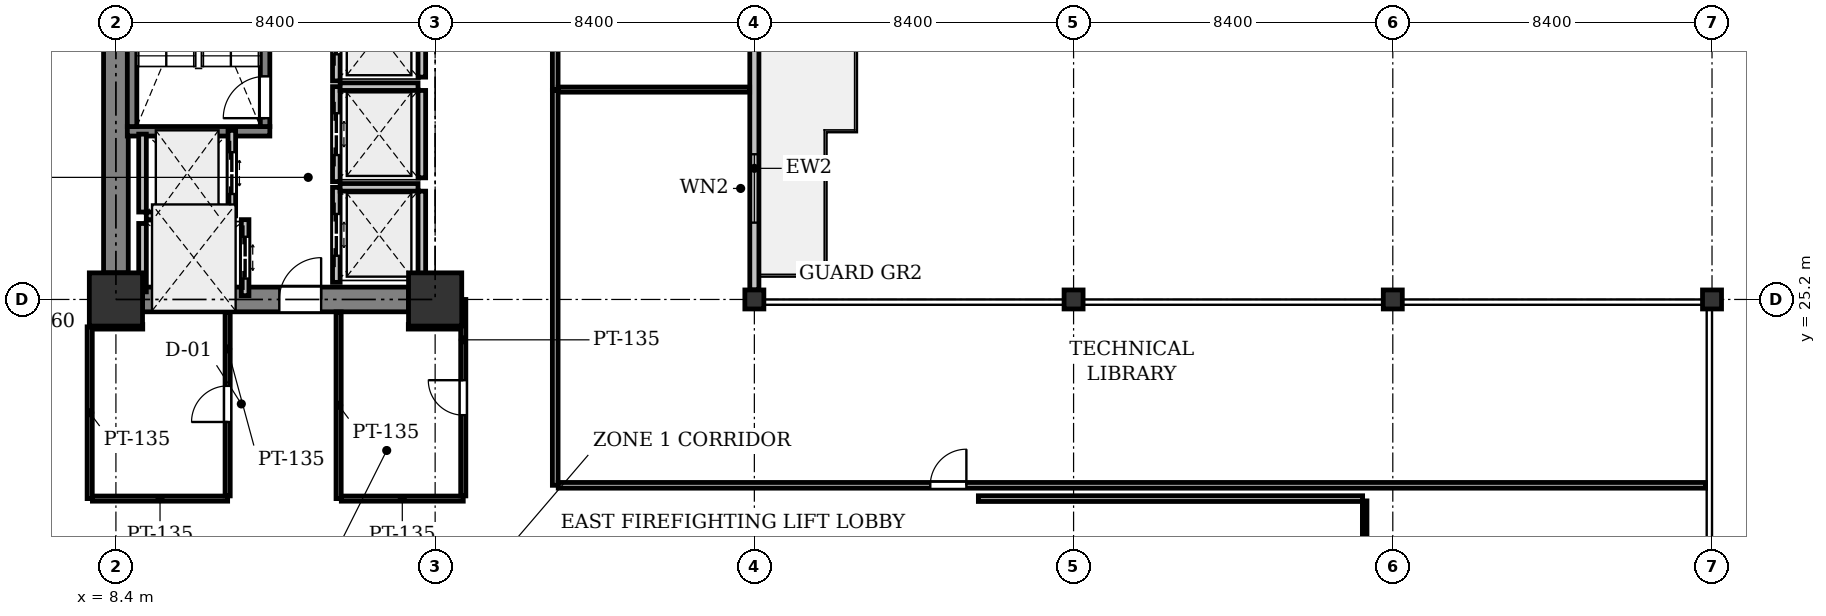
"""IFC4 building model, lengths in metres.
Left out: names, types, materials, properties, quantities, classifications, styles, units other than length and angle.
Written with IfcOpenShell. Run it as: python <this file> out.ifc"""

import sys

from ifc_helpers import new_model, si_unit, direction, frame, frame_2d, origin, origin_2d, place, context, subcontext, project, spatial, rectangle, i_section, extrude, element, fill, save


model = new_model("IFC4")
c1 = context("Model", 3, precision=1e-05, world=origin(), true_north=direction((0.0, 1.0)))
c2 = subcontext(c1, "Body", "Model", "MODEL_VIEW")
j1 = project(units=[si_unit("LENGTHUNIT", "METRE"), si_unit("PLANEANGLEUNIT", "RADIAN")], contexts=[c1])
p1 = place(None, origin())
s1 = spatial("IfcSite", under=j1, at=p1, CompositionType="ELEMENT")
p2 = place(p1, origin())
s2 = spatial("IfcBuilding", under=s1, at=p2, CompositionType="ELEMENT")
p3 = place(p2, frame((0.0, 0.0, 50.0)))
s3 = spatial("IfcBuildingStorey", under=s2, at=p3, CompositionType="ELEMENT", Elevation=50.0)
for number, where, z_axis, x_axis in (
    (1, (8.4, 25.2, 0.0), (0.0, 0.0, 1.0), (1.0, 0.0, 0.0)),
    (2, (16.8, 25.2, 0.0), (0.0, 0.0, 1.0), (1.0, 0.0, 0.0)),
):
    element("IfcColumn", number, at=place(p3, frame(where, z_axis=z_axis, x_axis=x_axis)), inside=s3, PredefinedType="COLUMN", context=c2, shape_type="SweptSolid", body=[
        extrude(rectangle(XDim=1.4, YDim=1.4, at=origin_2d()), origin(), (0.0, 0.0, 1.0), 4.2),
    ])
for number, where, z_axis, x_axis in (
    (3, (25.2, 25.2, 0.0), (0.0, 0.0, 1.0), (1.0, 0.0, 0.0)),
    (4, (33.6, 25.2, 0.0), (0.0, 0.0, 1.0), (1.0, 0.0, 0.0)),
    (5, (42.0, 25.2, 0.0), (0.0, 0.0, 1.0), (1.0, 0.0, 0.0)),
    (6, (50.4, 25.2, 0.0), (0.0, 0.0, 1.0), (1.0, 0.0, 0.0)),
):
    element("IfcColumn", number, at=place(p3, frame(where, z_axis=z_axis, x_axis=x_axis)), inside=s3, PredefinedType="COLUMN", context=c2, shape_type="SweptSolid", body=[
        extrude(i_section(OverallWidth=0.5, OverallDepth=0.5, WebThickness=0.028, FlangeThickness=0.04, at=origin_2d()), origin(), (0.0, 0.0, 1.0), 4.2),
    ])
p4 = place(p3, frame((25.2, 33.35, 0.0), z_axis=(0.0, 0.0, 1.0), x_axis=(0.0, -1.0, 0.0)))
e7 = element("IfcWall", 7, at=p4, inside=s3, PredefinedType="STANDARD", context=c2, shape_type="SweptSolid", body=[
    extrude(rectangle(XDim=7.9, YDim=0.24, at=frame_2d((3.95, 0.0))), origin(), (0.0, 0.0, 1.0), 3.471),
])
p5 = place(p4, frame((0.3, 0.0, 0.0)))
e8 = element("IfcOpeningElement", 8, at=p5, cuts=e7, PredefinedType="OPENING", context=c2, shape_type="SweptSolid", body=[
    extrude(rectangle(XDim=1.2, YDim=2.2, at=frame_2d((0.6, 1.1))), frame((0.0, 0.13, 0.0), z_axis=(0.0, -1.0, 0.0), x_axis=(1.0, 0.0, 0.0)), (0.0, 0.0, 1.0), 0.26),
])
p6 = place(p4, frame((4.329, 0.0, 0.9)))
e9 = element("IfcOpeningElement", 9, at=p6, cuts=e7, PredefinedType="OPENING", context=c2, shape_type="SweptSolid", body=[
    extrude(rectangle(XDim=1.8, YDim=1.6, at=frame_2d((0.9, 0.8))), frame((0.0, 0.13, 0.0), z_axis=(0.0, -1.0, 0.0), x_axis=(1.0, 0.0, 0.0)), (0.0, 0.0, 1.0), 0.26),
])
p7 = place(p3, frame((8.4, 25.9, 0.0), z_axis=(0.0, 0.0, 1.0), x_axis=(0.0, 1.0, 0.0)))
e10 = element("IfcWall", 10, at=p7, inside=s3, PredefinedType="SHEAR", context=c2, shape_type="SweptSolid", body=[
    extrude(rectangle(XDim=7.0, YDim=0.65, at=frame_2d((3.5, 0.0))), origin(), (0.0, 0.0, 1.0), 3.925),
])
p8 = place(p3, frame((9.1, 25.2, 0.0), z_axis=(0.0, 0.0, 1.0), x_axis=(1.0, 0.0, 0.0)))
e11 = element("IfcWall", 11, at=p8, inside=s3, PredefinedType="SHEAR", context=c2, shape_type="SweptSolid", body=[
    extrude(rectangle(XDim=7.0, YDim=0.65, at=frame_2d((3.5, 0.0))), origin(), (0.0, 0.0, 1.0), 3.925),
])
p9 = place(p8, frame((3.6, 0.0, 0.0)))
e12 = element("IfcOpeningElement", 12, at=p9, cuts=e11, PredefinedType="OPENING", context=c2, shape_type="SweptSolid", body=[
    extrude(rectangle(XDim=1.1, YDim=2.15, at=frame_2d((0.55, 1.075))), frame((0.0, 0.335, 0.0), z_axis=(0.0, -1.0, 0.0), x_axis=(1.0, 0.0, 0.0)), (0.0, 0.0, 1.0), 0.67),
])
p10 = place(p3, frame((12.45, 29.625, 0.0), z_axis=(0.0, 0.0, 1.0), x_axis=(-1.0, 0.0, 0.0)))
e13 = element("IfcWall", 13, at=p10, inside=s3, PredefinedType="SHEAR", context=c2, shape_type="SweptSolid", body=[
    extrude(rectangle(XDim=3.75, YDim=0.25, at=frame_2d((1.875, 0.0))), origin(), (0.0, 0.0, 1.0), 3.925),
])
p11 = place(p3, frame((12.325, 29.75, 0.0), z_axis=(0.0, 0.0, 1.0), x_axis=(0.0, 1.0, 0.0)))
e14 = element("IfcWall", 14, at=p11, inside=s3, PredefinedType="SHEAR", context=c2, shape_type="SweptSolid", body=[
    extrude(rectangle(XDim=7.75, YDim=0.25, at=frame_2d((3.875, 0.0))), origin(), (0.0, 0.0, 1.0), 3.925),
])
p12 = place(p11, frame((0.22, 0.0, 0.0)))
e15 = element("IfcOpeningElement", 15, at=p12, cuts=e14, PredefinedType="OPENING", context=c2, shape_type="SweptSolid", body=[
    extrude(rectangle(XDim=1.1, YDim=2.15, at=frame_2d((0.55, 1.075))), frame((0.0, 0.135, 0.0), z_axis=(0.0, -1.0, 0.0), x_axis=(1.0, 0.0, 0.0)), (0.0, 0.0, 1.0), 0.27),
])
p13 = place(p3, frame((8.825, 29.75, 0.0), z_axis=(0.0, 0.0, 1.0), x_axis=(0.0, 1.0, 0.0)))
e16 = element("IfcWall", 16, at=p13, inside=s3, PredefinedType="SHEAR", context=c2, shape_type="SweptSolid", body=[
    extrude(rectangle(XDim=7.75, YDim=0.25, at=frame_2d((3.875, 0.0))), origin(), (0.0, 0.0, 1.0), 3.925),
])
p14 = place(p3, frame((11.45, 27.4, 0.0), z_axis=(0.0, 0.0, 1.0), x_axis=(0.0, 1.0, 0.0)))
e17 = element("IfcWall", 17, at=p14, inside=s3, PredefinedType="PARTITIONING", context=c2, shape_type="SweptSolid", body=[
    extrude(rectangle(XDim=2.25, YDim=0.2, at=frame_2d((1.125, 0.0))), origin(), (0.0, 0.0, 1.0), 3.925),
])
p15 = place(p14, frame((0.575, 0.0, 0.0)))
e18 = element("IfcOpeningElement", 18, at=p15, cuts=e17, PredefinedType="OPENING", context=c2, shape_type="SweptSolid", body=[
    extrude(rectangle(XDim=1.1, YDim=2.2, at=frame_2d((0.55, 1.1))), frame((0.0, 0.11, 0.0), z_axis=(0.0, -1.0, 0.0), x_axis=(1.0, 0.0, 0.0)), (0.0, 0.0, 1.0), 0.22),
])
p16 = place(p3, frame((9.1, 27.5, 0.0), z_axis=(0.0, 0.0, 1.0), x_axis=(0.0, 1.0, 0.0)))
e19 = element("IfcWall", 19, at=p16, inside=s3, PredefinedType="PARTITIONING", context=c2, shape_type="SweptSolid", body=[
    extrude(rectangle(XDim=2.05, YDim=0.2, at=frame_2d((1.025, 0.0))), origin(), (0.0, 0.0, 1.0), 3.925),
])
p17 = place(p3, frame((9.2, 27.4, 0.0), z_axis=(0.0, 0.0, 1.0), x_axis=(1.0, 0.0, 0.0)))
e20 = element("IfcWall", 20, at=p17, inside=s3, PredefinedType="PARTITIONING", context=c2, shape_type="SweptSolid", body=[
    extrude(rectangle(XDim=2.15, YDim=0.2, at=frame_2d((1.075, 0.0))), origin(), (0.0, 0.0, 1.0), 3.925),
])
p18 = place(p3, frame((11.8, 25.3, 0.0), z_axis=(0.0, 0.0, 1.0), x_axis=(0.0, 1.0, 0.0)))
e21 = element("IfcWall", 21, at=p18, inside=s3, PredefinedType="PARTITIONING", context=c2, shape_type="SweptSolid", body=[
    extrude(rectangle(XDim=2.0, YDim=0.2, at=frame_2d((1.0, 0.0))), origin(), (0.0, 0.0, 1.0), 3.925),
])
p19 = place(p18, frame((0.45, 0.0, 0.0)))
e22 = element("IfcOpeningElement", 22, at=p19, cuts=e21, PredefinedType="OPENING", context=c2, shape_type="SweptSolid", body=[
    extrude(rectangle(XDim=1.1, YDim=2.2, at=frame_2d((0.55, 1.1))), frame((0.0, 0.11, 0.0), z_axis=(0.0, -1.0, 0.0), x_axis=(1.0, 0.0, 0.0)), (0.0, 0.0, 1.0), 0.22),
])
p20 = place(p3, frame((9.1, 25.4, 0.0), z_axis=(0.0, 0.0, 1.0), x_axis=(0.0, 1.0, 0.0)))
e23 = element("IfcWall", 23, at=p20, inside=s3, PredefinedType="PARTITIONING", context=c2, shape_type="SweptSolid", body=[
    extrude(rectangle(XDim=1.8, YDim=0.2, at=frame_2d((0.9, 0.0))), origin(), (0.0, 0.0, 1.0), 3.925),
])
p21 = place(p3, frame((14.2, 25.65, 0.0), z_axis=(0.0, 0.0, 1.0), x_axis=(0.0, 1.0, 0.0)))
e24 = element("IfcWall", 24, at=p21, inside=s3, PredefinedType="PARTITIONING", context=c2, shape_type="SweptSolid", body=[
    extrude(rectangle(XDim=2.5, YDim=0.2, at=frame_2d((1.25, 0.0))), origin(), (0.0, 0.0, 1.0), 3.925),
])
p22 = place(p21, frame((0.7, 0.0, 0.0)))
e25 = element("IfcOpeningElement", 25, at=p22, cuts=e24, PredefinedType="OPENING", context=c2, shape_type="SweptSolid", body=[
    extrude(rectangle(XDim=1.1, YDim=2.2, at=frame_2d((0.55, 1.1))), frame((0.0, 0.11, 0.0), z_axis=(0.0, -1.0, 0.0), x_axis=(1.0, 0.0, 0.0)), (0.0, 0.0, 1.0), 0.22),
])
p23 = place(p3, frame((16.45, 25.75, 0.0), z_axis=(0.0, 0.0, 1.0), x_axis=(0.0, 1.0, 0.0)))
e26 = element("IfcWall", 26, at=p23, inside=s3, PredefinedType="PARTITIONING", context=c2, shape_type="SweptSolid", body=[
    extrude(rectangle(XDim=2.3, YDim=0.2, at=frame_2d((1.15, 0.0))), origin(), (0.0, 0.0, 1.0), 3.925),
])
p24 = place(p3, frame((14.3, 28.15, 0.0), z_axis=(0.0, 0.0, 1.0), x_axis=(1.0, 0.0, 0.0)))
e27 = element("IfcWall", 27, at=p24, inside=s3, PredefinedType="PARTITIONING", context=c2, shape_type="SweptSolid", body=[
    extrude(rectangle(XDim=2.05, YDim=0.2, at=frame_2d((1.025, 0.0))), origin(), (0.0, 0.0, 1.0), 3.925),
])
p25 = place(p3, frame((14.2, 28.3, 0.0), z_axis=(0.0, 0.0, 1.0), x_axis=(0.0, 1.0, 0.0)))
e28 = element("IfcWall", 28, at=p25, inside=s3, PredefinedType="PARTITIONING", context=c2, shape_type="SweptSolid", body=[
    extrude(rectangle(XDim=2.5, YDim=0.2, at=frame_2d((1.25, 0.0))), origin(), (0.0, 0.0, 1.0), 3.925),
])
p26 = place(p25, frame((0.7, 0.0, 0.0)))
e29 = element("IfcOpeningElement", 29, at=p26, cuts=e28, PredefinedType="OPENING", context=c2, shape_type="SweptSolid", body=[
    extrude(rectangle(XDim=1.1, YDim=2.2, at=frame_2d((0.55, 1.1))), frame((0.0, 0.11, 0.0), z_axis=(0.0, -1.0, 0.0), x_axis=(1.0, 0.0, 0.0)), (0.0, 0.0, 1.0), 0.22),
])
p27 = place(p3, frame((16.45, 28.4, 0.0), z_axis=(0.0, 0.0, 1.0), x_axis=(0.0, 1.0, 0.0)))
e30 = element("IfcWall", 30, at=p27, inside=s3, PredefinedType="PARTITIONING", context=c2, shape_type="SweptSolid", body=[
    extrude(rectangle(XDim=2.3, YDim=0.2, at=frame_2d((1.15, 0.0))), origin(), (0.0, 0.0, 1.0), 3.925),
])
p28 = place(p3, frame((14.3, 30.8, 0.0), z_axis=(0.0, 0.0, 1.0), x_axis=(1.0, 0.0, 0.0)))
e31 = element("IfcWall", 31, at=p28, inside=s3, PredefinedType="PARTITIONING", context=c2, shape_type="SweptSolid", body=[
    extrude(rectangle(XDim=2.05, YDim=0.2, at=frame_2d((1.025, 0.0))), origin(), (0.0, 0.0, 1.0), 3.925),
])
p29 = place(p3, frame((14.2, 30.95, 0.0), z_axis=(0.0, 0.0, 1.0), x_axis=(0.0, 1.0, 0.0)))
e32 = element("IfcWall", 32, at=p29, inside=s3, PredefinedType="PARTITIONING", context=c2, shape_type="SweptSolid", body=[
    extrude(rectangle(XDim=2.5, YDim=0.2, at=frame_2d((1.25, 0.0))), origin(), (0.0, 0.0, 1.0), 3.925),
])
p30 = place(p29, frame((0.7, 0.0, 0.0)))
e33 = element("IfcOpeningElement", 33, at=p30, cuts=e32, PredefinedType="OPENING", context=c2, shape_type="SweptSolid", body=[
    extrude(rectangle(XDim=1.1, YDim=2.2, at=frame_2d((0.55, 1.1))), frame((0.0, 0.11, 0.0), z_axis=(0.0, -1.0, 0.0), x_axis=(1.0, 0.0, 0.0)), (0.0, 0.0, 1.0), 0.22),
])
p31 = place(p3, frame((16.45, 31.05, 0.0), z_axis=(0.0, 0.0, 1.0), x_axis=(0.0, 1.0, 0.0)))
e34 = element("IfcWall", 34, at=p31, inside=s3, PredefinedType="PARTITIONING", context=c2, shape_type="SweptSolid", body=[
    extrude(rectangle(XDim=2.3, YDim=0.2, at=frame_2d((1.15, 0.0))), origin(), (0.0, 0.0, 1.0), 3.925),
])
p32 = place(p3, frame((14.26, 24.871, 0.0), z_axis=(0.0, 0.0, 1.0), x_axis=(0.0, -1.0, 0.0)))
e35 = element("IfcWall", 35, at=p32, inside=s3, PredefinedType="PARTITIONING", context=c2, shape_type="SweptSolid", body=[
    extrude(rectangle(XDim=4.911, YDim=0.135, at=frame_2d((2.456, 0.0))), origin(), (0.0, 0.0, 1.0), 3.925),
])
p33 = place(p3, frame((14.332, 19.96, 0.0), z_axis=(0.0, 0.0, 1.0), x_axis=(1.0, 0.0, 0.0)))
e36 = element("IfcWall", 36, at=p33, inside=s3, PredefinedType="PARTITIONING", context=c2, shape_type="SweptSolid", body=[
    extrude(rectangle(XDim=3.208, YDim=0.135, at=frame_2d((1.604, 0.0))), origin(), (0.0, 0.0, 1.0), 3.323),
])
p34 = place(p3, frame((17.54, 20.031, 0.0), z_axis=(0.0, 0.0, 1.0), x_axis=(0.0, 1.0, 0.0)))
e37 = element("IfcWall", 37, at=p34, inside=s3, PredefinedType="PARTITIONING", context=c2, shape_type="SweptSolid", body=[
    extrude(rectangle(XDim=5.168, YDim=0.135, at=frame_2d((2.584, 0.0))), origin(), (0.0, 0.0, 1.0), 3.313),
])
p35 = place(p34, frame((2.124, 0.0, 0.0)))
e38 = element("IfcOpeningElement", 38, at=p35, cuts=e37, PredefinedType="OPENING", context=c2, shape_type="SweptSolid", body=[
    extrude(rectangle(XDim=0.92, YDim=2.1, at=frame_2d((0.46, 1.05))), frame((0.0, 0.077, 0.0), z_axis=(0.0, -1.0, 0.0), x_axis=(1.0, 0.0, 0.0)), (0.0, 0.0, 1.0), 0.155),
])
p36 = place(p3, frame((17.469, 24.48, 0.0), z_axis=(0.0, 0.0, 1.0), x_axis=(-0.99999993688, 0.000355302873, 0.0)))
e39 = element("IfcWall", 39, at=p36, inside=s3, PredefinedType="PARTITIONING", context=c2, shape_type="SweptSolid", body=[
    extrude(rectangle(XDim=1.374, YDim=0.12, at=frame_2d((0.687, 0.0))), origin(), (0.0, 0.0, 1.0), 3.323),
])
p37 = place(p3, frame((9.106, 24.481, 0.0), z_axis=(0.0, 0.0, 1.0), x_axis=(-0.999999755233, -0.000699667487, 0.0)))
e40 = element("IfcWall", 40, at=p37, inside=s3, PredefinedType="PARTITIONING", context=c2, shape_type="SweptSolid", body=[
    extrude(rectangle(XDim=1.396, YDim=0.12, at=frame_2d((0.698, 0.0))), origin(), (0.0, 0.0, 1.0), 3.323),
])
p38 = place(p3, frame((7.71, 24.48, 0.0), z_axis=(0.0, 0.0, 1.0), x_axis=(0.0, -1.0, 0.0)))
e41 = element("IfcWall", 41, at=p38, inside=s3, PredefinedType="PARTITIONING", context=c2, shape_type="SweptSolid", body=[
    extrude(rectangle(XDim=4.52, YDim=0.135, at=frame_2d((2.26, 0.0))), origin(), (0.0, 0.0, 1.0), 3.925),
])
p39 = place(p3, frame((7.781, 19.96, 0.0), z_axis=(0.0, 0.0, 1.0), x_axis=(1.0, 0.0, 0.0)))
e42 = element("IfcWall", 42, at=p39, inside=s3, PredefinedType="PARTITIONING", context=c2, shape_type="SweptSolid", body=[
    extrude(rectangle(XDim=3.559, YDim=0.135, at=frame_2d((1.779, 0.0))), origin(), (0.0, 0.0, 1.0), 3.323),
])
p40 = place(p3, frame((11.34, 20.031, 0.0), z_axis=(0.0, 0.0, 1.0), x_axis=(0.0, 1.0, 0.0)))
e43 = element("IfcWall", 43, at=p40, inside=s3, PredefinedType="PARTITIONING", context=c2, shape_type="SweptSolid", body=[
    extrude(rectangle(XDim=4.84, YDim=0.135, at=frame_2d((2.42, 0.0))), origin(), (0.0, 0.0, 1.0), 3.925),
])
p41 = place(p40, frame((1.945, 0.0, 0.0)))
e44 = element("IfcOpeningElement", 44, at=p41, cuts=e43, PredefinedType="OPENING", context=c2, shape_type="SweptSolid", body=[
    extrude(rectangle(XDim=0.95, YDim=2.15, at=frame_2d((0.475, 1.075))), frame((0.0, 0.077, 0.0), z_axis=(0.0, -1.0, 0.0), x_axis=(1.0, 0.0, 0.0)), (0.0, 0.0, 1.0), 0.155),
])
p42 = place(p3, frame((19.96, 40.8, 0.0), z_axis=(0.0, 0.0, 1.0), x_axis=(0.0, -1.0, 0.0)))
e45 = element("IfcWall", 45, at=p42, inside=s3, PredefinedType="PARTITIONING", context=c2, shape_type="SweptSolid", body=[
    extrude(rectangle(XDim=10.078, YDim=0.15, at=frame_2d((5.039, 0.0))), origin(), (0.0, 0.0, 1.0), 3.313),
])
p43 = place(p42, frame((4.564, 0.0, 0.0)))
e46 = element("IfcOpeningElement", 46, at=p43, cuts=e45, PredefinedType="OPENING", context=c2, shape_type="SweptSolid", body=[
    extrude(rectangle(XDim=0.95, YDim=2.15, at=frame_2d((0.475, 1.075))), frame((0.0, 0.085, 0.0), z_axis=(0.0, -1.0, 0.0), x_axis=(1.0, 0.0, 0.0)), (0.0, 0.0, 1.0), 0.17),
])
p44 = place(p3, frame((20.039, 30.722, 0.0), z_axis=(0.0, 0.0, 1.0), x_axis=(1.0, 0.0, 0.0)))
e47 = element("IfcWall", 47, at=p44, inside=s3, PredefinedType="PARTITIONING", context=c2, shape_type="SweptSolid", body=[
    extrude(rectangle(XDim=5.037, YDim=0.135, at=frame_2d((2.519, 0.0))), origin(), (0.0, 0.0, 1.0), 3.566),
])
p45 = place(p3, frame((19.96, 30.702, 0.0), z_axis=(0.0, 0.0, 1.0), x_axis=(0.0, -1.0, 0.0)))
e48 = element("IfcWall", 48, at=p45, inside=s3, PredefinedType="PARTITIONING", context=c2, shape_type="SweptSolid", body=[
    extrude(rectangle(XDim=10.392, YDim=0.15, at=frame_2d((5.196, 0.0))), origin(), (0.0, 0.0, 1.0), 3.313),
])
p46 = place(p3, frame((20.039, 20.31, 0.0), z_axis=(0.0, 0.0, 1.0), x_axis=(1.0, 0.0, 0.0)))
e49 = element("IfcWall", 49, at=p46, inside=s3, PredefinedType="PARTITIONING", context=c2, shape_type="SweptSolid", body=[
    extrude(rectangle(XDim=30.192, YDim=0.15, at=frame_2d((15.096, 0.0))), origin(), (0.0, 0.0, 1.0), 3.323),
])
p47 = place(p46, frame((9.79, 0.0, 0.0)))
e50 = element("IfcOpeningElement", 50, at=p47, cuts=e49, PredefinedType="OPENING", context=c2, shape_type="SweptSolid", body=[
    extrude(rectangle(XDim=0.95, YDim=2.15, at=frame_2d((0.475, 1.075))), frame((0.0, 0.085, 0.0), z_axis=(0.0, -1.0, 0.0), x_axis=(1.0, 0.0, 0.0)), (0.0, 0.0, 1.0), 0.17),
])
p48 = place(p3, frame((31.094, 19.96, 0.0), z_axis=(0.0, 0.0, 1.0), x_axis=(1.0, 0.0, 0.0)))
e51 = element("IfcWall", 51, at=p48, inside=s3, PredefinedType="PARTITIONING", context=c2, shape_type="SweptSolid", body=[
    extrude(rectangle(XDim=10.111, YDim=0.15, at=frame_2d((5.056, 0.0))), origin(), (0.0, 0.0, 1.0), 3.323),
])
p49 = place(p3, frame((41.26, 19.9, 0.0), z_axis=(0.0, 0.0, 1.0), x_axis=(-0.000105876124, -0.999999994395, 0.0)))
e52 = element("IfcWall", 52, at=p49, inside=s3, PredefinedType="PARTITIONING", context=c2, shape_type="SweptSolid", body=[
    extrude(rectangle(XDim=2.306, YDim=0.12, at=frame_2d((1.153, 0.0))), origin(), (0.0, 0.0, 1.0), 3.925),
])
p50 = place(p6, origin())
e53 = element("IfcWindow", 53, at=p50, inside=s3, PartitioningType="SINGLE_PANEL", PredefinedType="WINDOW", context=c2, shape_type="SweptSolid", body=[
    extrude(rectangle(XDim=1.8, YDim=1.6, at=frame_2d((0.9, 0.8))), frame((0.0, 0.03, 0.0), z_axis=(0.0, -1.0, 0.0), x_axis=(1.0, 0.0, 0.0)), (0.0, 0.0, 1.0), 0.06),
])
fill(e9, e53)
p51 = place(p9, origin())
e54 = element("IfcDoor", 54, at=p51, inside=s3, OperationType="SINGLE_SWING_RIGHT", PredefinedType="DOOR", context=c2, shape_type="SweptSolid", body=[
    extrude(rectangle(XDim=1.1, YDim=2.15, at=frame_2d((0.55, 1.075))), frame((0.0, 0.025, 0.0), z_axis=(0.0, -1.0, 0.0), x_axis=(1.0, 0.0, 0.0)), (0.0, 0.0, 1.0), 0.05),
])
fill(e12, e54)
p52 = place(p12, origin())
e55 = element("IfcDoor", 55, at=p52, inside=s3, OperationType="SINGLE_SWING_LEFT", PredefinedType="DOOR", context=c2, shape_type="SweptSolid", body=[
    extrude(rectangle(XDim=1.1, YDim=2.15, at=frame_2d((0.55, 1.075))), frame((0.0, 0.025, 0.0), z_axis=(0.0, -1.0, 0.0), x_axis=(1.0, 0.0, 0.0)), (0.0, 0.0, 1.0), 0.05),
])
fill(e15, e55)
p53 = place(p15, origin())
e56 = element("IfcDoor", 56, at=p53, inside=s3, OperationType="DOUBLE_DOOR_SLIDING", PredefinedType="DOOR", context=c2, shape_type="SweptSolid", body=[
    extrude(rectangle(XDim=1.1, YDim=2.2, at=frame_2d((0.55, 1.1))), frame((0.0, 0.025, 0.0), z_axis=(0.0, -1.0, 0.0), x_axis=(1.0, 0.0, 0.0)), (0.0, 0.0, 1.0), 0.05),
])
fill(e18, e56)
p54 = place(p19, origin())
e57 = element("IfcDoor", 57, at=p54, inside=s3, OperationType="DOUBLE_DOOR_SLIDING", PredefinedType="DOOR", context=c2, shape_type="SweptSolid", body=[
    extrude(rectangle(XDim=1.1, YDim=2.2, at=frame_2d((0.55, 1.1))), frame((0.0, 0.025, 0.0), z_axis=(0.0, -1.0, 0.0), x_axis=(1.0, 0.0, 0.0)), (0.0, 0.0, 1.0), 0.05),
])
fill(e22, e57)
p55 = place(p22, origin())
e58 = element("IfcDoor", 58, at=p55, inside=s3, OperationType="DOUBLE_DOOR_SLIDING", PredefinedType="DOOR", context=c2, shape_type="SweptSolid", body=[
    extrude(rectangle(XDim=1.1, YDim=2.2, at=frame_2d((0.55, 1.1))), frame((0.0, 0.025, 0.0), z_axis=(0.0, -1.0, 0.0), x_axis=(1.0, 0.0, 0.0)), (0.0, 0.0, 1.0), 0.05),
])
fill(e25, e58)
p56 = place(p26, origin())
e59 = element("IfcDoor", 59, at=p56, inside=s3, OperationType="DOUBLE_DOOR_SLIDING", PredefinedType="DOOR", context=c2, shape_type="SweptSolid", body=[
    extrude(rectangle(XDim=1.1, YDim=2.2, at=frame_2d((0.55, 1.1))), frame((0.0, 0.025, 0.0), z_axis=(0.0, -1.0, 0.0), x_axis=(1.0, 0.0, 0.0)), (0.0, 0.0, 1.0), 0.05),
])
fill(e29, e59)
p57 = place(p30, origin())
e60 = element("IfcDoor", 60, at=p57, inside=s3, OperationType="DOUBLE_DOOR_SLIDING", PredefinedType="DOOR", context=c2, shape_type="SweptSolid", body=[
    extrude(rectangle(XDim=1.1, YDim=2.2, at=frame_2d((0.55, 1.1))), frame((0.0, 0.025, 0.0), z_axis=(0.0, -1.0, 0.0), x_axis=(1.0, 0.0, 0.0)), (0.0, 0.0, 1.0), 0.05),
])
fill(e33, e60)
p58 = place(p35, origin())
e61 = element("IfcDoor", 61, at=p58, inside=s3, OperationType="SINGLE_SWING_RIGHT", PredefinedType="DOOR", context=c2, shape_type="SweptSolid", body=[
    extrude(rectangle(XDim=0.92, YDim=2.1, at=frame_2d((0.46, 1.05))), frame((0.0, 0.025, 0.0), z_axis=(0.0, -1.0, 0.0), x_axis=(1.0, 0.0, 0.0)), (0.0, 0.0, 1.0), 0.05),
])
fill(e38, e61)
p59 = place(p41, origin())
e62 = element("IfcDoor", 62, at=p59, inside=s3, OperationType="SINGLE_SWING_LEFT", PredefinedType="DOOR", context=c2, shape_type="SweptSolid", body=[
    extrude(rectangle(XDim=0.95, YDim=2.15, at=frame_2d((0.475, 1.075))), frame((0.0, 0.025, 0.0), z_axis=(0.0, -1.0, 0.0), x_axis=(1.0, 0.0, 0.0)), (0.0, 0.0, 1.0), 0.05),
])
fill(e44, e62)
p60 = place(p47, origin())
e63 = element("IfcDoor", 63, at=p60, inside=s3, OperationType="SINGLE_SWING_RIGHT", PredefinedType="DOOR", context=c2, shape_type="SweptSolid", body=[
    extrude(rectangle(XDim=0.95, YDim=2.15, at=frame_2d((0.475, 1.075))), frame((0.0, 0.025, 0.0), z_axis=(0.0, -1.0, 0.0), x_axis=(1.0, 0.0, 0.0)), (0.0, 0.0, 1.0), 0.05),
])
fill(e50, e63)
save(model, sys.argv[1])
